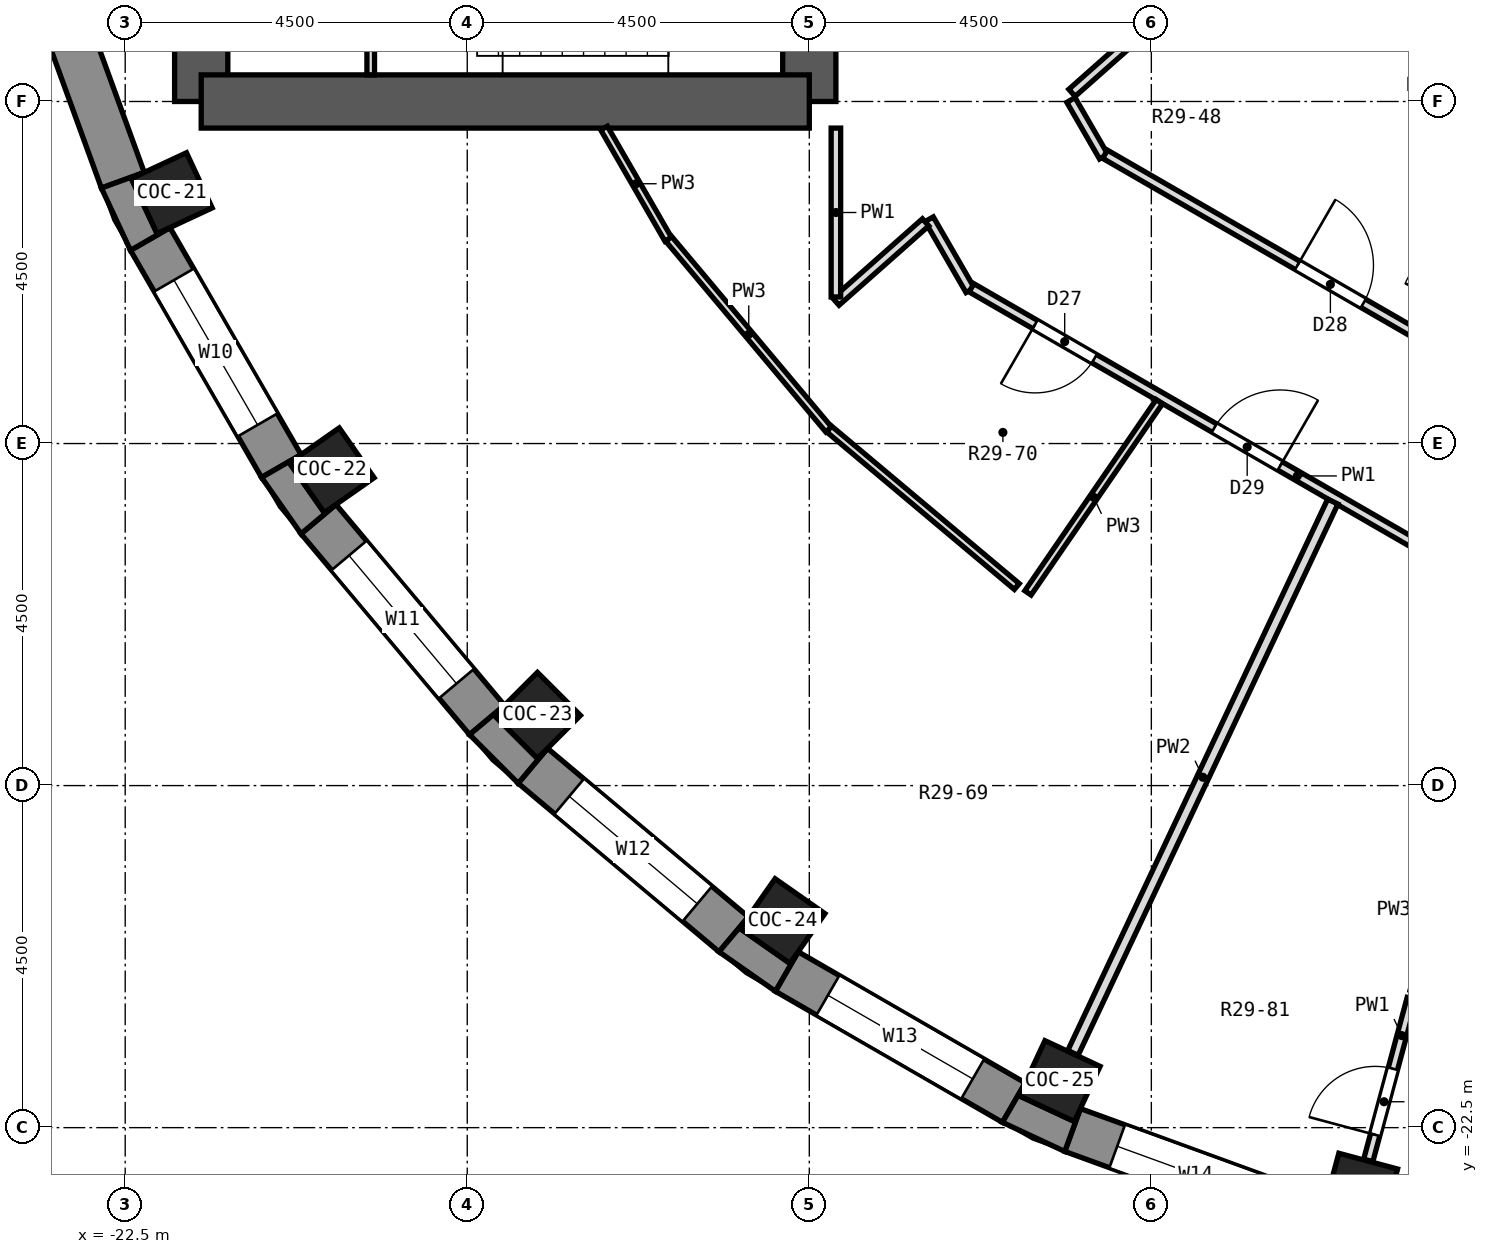
"""IFC4 building model, lengths in metres.
Left out: names, types, materials, properties, quantities, classifications, styles, units other than length and angle.
Written with IfcOpenShell. Run it as: python <this file> out.ifc"""

import sys

from ifc_helpers import new_model, si_unit, direction, frame, frame_2d, origin, origin_2d, place, context, subcontext, project, spatial, polyline, rectangle, outline, extrude, element, fill, save


model = new_model("IFC4")
c1 = context("Model", 3, precision=1e-05, world=origin(), true_north=direction((0.0, 1.0)))
c2 = subcontext(c1, "Body", "Model", "MODEL_VIEW")
j1 = project(units=[si_unit("LENGTHUNIT", "METRE"), si_unit("PLANEANGLEUNIT", "RADIAN")], contexts=[c1])
p1 = place(None, origin())
s1 = spatial("IfcSite", under=j1, at=p1, CompositionType="ELEMENT")
p2 = place(p1, origin())
s2 = spatial("IfcBuilding", under=s1, at=p2, CompositionType="ELEMENT")
p3 = place(p2, frame((0.0, 0.0, 200.4)))
s3 = spatial("IfcBuildingStorey", under=s2, at=p3, CompositionType="ELEMENT", Elevation=200.4)
for number, where, z_axis, x_axis in (
    (1, (-21.887, -10.206, 0.0), (0.0, 0.0, 1.0), (-0.906, -0.423, 0.0)),
    (2, (-19.782, -13.852, 0.0), (0.0, 0.0, 1.0), (-0.819, -0.574, 0.0)),
    (3, (-17.077, -17.077, 0.0), (0.0, 0.0, 1.0), (-0.707, -0.707, 0.0)),
    (4, (-13.852, -19.782, 0.0), (0.0, 0.0, 1.0), (-0.574, -0.819, 0.0)),
    (5, (-10.206, -21.887, 0.0), (0.0, 0.0, 1.0), (-0.423, -0.906, 0.0)),
    (6, (-6.25, -23.327, 0.0), (0.0, 0.0, 1.0), (-0.259, -0.966, 0.0)),
):
    element("IfcColumn", number, at=place(p3, frame(where, z_axis=z_axis, x_axis=x_axis)), inside=s3, PredefinedType="COLUMN", context=c2, shape_type="SweptSolid", body=[
        extrude(rectangle(XDim=0.8, YDim=0.8, at=origin_2d()), origin(), (0.0, 0.0, 1.0), 3.3),
    ])
p4 = place(p3, frame((-13.5, -9.0, 0.0), z_axis=(0.0, 0.0, 1.0), x_axis=(0.0, 1.0, 0.0)))
e7 = element("IfcWall", 7, at=p4, inside=s3, PredefinedType="SHEAR", context=c2, shape_type="SweptSolid", body=[
    extrude(rectangle(XDim=18.0, YDim=0.7, at=frame_2d((9.0, 0.0))), origin(), (0.0, 0.0, 1.0), 3.3),
])
p5 = place(p4, frame((15.4, 0.0, 0.0)))
e8 = element("IfcOpeningElement", 8, at=p5, cuts=e7, PredefinedType="OPENING", context=c2, shape_type="SweptSolid", body=[
    extrude(rectangle(XDim=1.2, YDim=2.1, at=frame_2d((0.6, 1.05))), frame((0.0, 0.362, 0.0), z_axis=(0.0, -1.0, 0.0), x_axis=(1.0, 0.0, 0.0)), (0.0, 0.0, 1.0), 0.724),
])
p6 = place(p4, frame((1.4, 0.0, 0.0)))
e9 = element("IfcOpeningElement", 9, at=p6, cuts=e7, PredefinedType="OPENING", context=c2, shape_type="SweptSolid", body=[
    extrude(rectangle(XDim=1.2, YDim=2.1, at=frame_2d((0.6, 1.05))), frame((0.0, 0.362, 0.0), z_axis=(0.0, -1.0, 0.0), x_axis=(1.0, 0.0, 0.0)), (0.0, 0.0, 1.0), 0.724),
])
p7 = place(p4, frame((7.5, 0.0, 0.0)))
e10 = element("IfcOpeningElement", 10, at=p7, cuts=e7, PredefinedType="OPENING", context=c2, shape_type="SweptSolid", body=[
    extrude(rectangle(XDim=3.0, YDim=2.4, at=frame_2d((1.5, 1.2))), frame((0.0, 0.362, 0.0), z_axis=(0.0, -1.0, 0.0), x_axis=(1.0, 0.0, 0.0)), (0.0, 0.0, 1.0), 0.724),
])
p8 = place(p3, frame((-21.5, -9.0, 0.0), z_axis=(0.0, 0.0, 1.0), x_axis=(0.0, 1.0, 0.0)))
e11 = element("IfcWall", 11, at=p8, inside=s3, PredefinedType="SHEAR", context=c2, shape_type="SweptSolid", body=[
    extrude(rectangle(XDim=18.0, YDim=0.7, at=frame_2d((9.0, 0.0))), origin(), (0.0, 0.0, 1.0), 3.3),
])
p9 = place(p8, frame((9.45, 0.0, 0.0)))
e12 = element("IfcOpeningElement", 12, at=p9, cuts=e11, PredefinedType="OPENING", context=c2, shape_type="SweptSolid", body=[
    extrude(rectangle(XDim=0.9, YDim=2.1, at=frame_2d((0.45, 1.05))), frame((0.0, 0.362, 0.0), z_axis=(0.0, -1.0, 0.0), x_axis=(1.0, 0.0, 0.0)), (0.0, 0.0, 1.0), 0.724),
])
p10 = place(p8, frame((7.65, 0.0, 0.0)))
e13 = element("IfcOpeningElement", 13, at=p10, cuts=e11, PredefinedType="OPENING", context=c2, shape_type="SweptSolid", body=[
    extrude(rectangle(XDim=0.9, YDim=2.1, at=frame_2d((0.45, 1.05))), frame((0.0, 0.362, 0.0), z_axis=(0.0, -1.0, 0.0), x_axis=(1.0, 0.0, 0.0)), (0.0, 0.0, 1.0), 0.724),
])
p11 = place(p3, frame((-13.5, -9.0, 0.0), z_axis=(0.0, 0.0, 1.0), x_axis=(-1.0, 0.0, 0.0)))
e14 = element("IfcWall", 14, at=p11, inside=s3, PredefinedType="SHEAR", context=c2, shape_type="SweptSolid", body=[
    extrude(rectangle(XDim=8.0, YDim=0.7, at=frame_2d((4.0, 0.0))), origin(), (0.0, 0.0, 1.0), 3.3),
])
p12 = place(p3, frame((-23.711, -6.794, 0.0), z_axis=(0.0, 0.0, 1.0), x_axis=(0.342032843455, -0.93968799822, 0.0)))
e15 = element("IfcWall", 15, at=p12, inside=s3, PredefinedType="SOLIDWALL", context=c2, shape_type="SweptSolid", body=[
    extrude(rectangle(XDim=3.45, YDim=0.6, at=frame_2d((1.725, 0.0))), origin(), (0.0, 0.0, 1.0), 2.85),
])
p13 = place(p3, frame((-22.171, -10.809, 0.0), z_axis=(0.0, 0.0, 1.0), x_axis=(0.499998129301, -0.86602648383, 0.0)))
e16 = element("IfcWall", 16, at=p13, inside=s3, PredefinedType="SOLIDWALL", context=c2, shape_type="SweptSolid", body=[
    extrude(rectangle(XDim=3.45, YDim=0.6, at=frame_2d((1.725, 0.0))), origin(), (0.0, 0.0, 1.0), 2.85),
])
p14 = place(p13, frame((0.625, 0.0, 0.9)))
e17 = element("IfcOpeningElement", 17, at=p14, cuts=e16, PredefinedType="OPENING", context=c2, shape_type="SweptSolid", body=[
    extrude(rectangle(XDim=2.2, YDim=1.8, at=frame_2d((1.1, 0.9))), frame((0.0, 0.312, 0.0), z_axis=(0.0, -1.0, 0.0), x_axis=(1.0, 0.0, 0.0)), (0.0, 0.0, 1.0), 0.624),
])
p15 = place(p3, frame((-19.957, -14.494, 0.0), z_axis=(0.0, 0.0, 1.0), x_axis=(0.642770398358, -0.766058884809, 0.0)))
e18 = element("IfcWall", 18, at=p15, inside=s3, PredefinedType="SOLIDWALL", context=c2, shape_type="SweptSolid", body=[
    extrude(rectangle(XDim=3.449, YDim=0.6, at=frame_2d((1.725, 0.0))), origin(), (0.0, 0.0, 1.0), 2.85),
])
p16 = place(p15, frame((0.625, 0.0, 0.9)))
e19 = element("IfcOpeningElement", 19, at=p16, cuts=e18, PredefinedType="OPENING", context=c2, shape_type="SweptSolid", body=[
    extrude(rectangle(XDim=2.2, YDim=1.8, at=frame_2d((1.1, 0.9))), frame((0.0, 0.312, 0.0), z_axis=(0.0, -1.0, 0.0), x_axis=(1.0, 0.0, 0.0)), (0.0, 0.0, 1.0), 0.624),
])
p17 = place(p3, frame((-17.137, -17.74, 0.0), z_axis=(0.0, 0.0, 1.0), x_axis=(0.766058884809, -0.642770398358, 0.0)))
e20 = element("IfcWall", 20, at=p17, inside=s3, PredefinedType="SOLIDWALL", context=c2, shape_type="SweptSolid", body=[
    extrude(rectangle(XDim=3.449, YDim=0.6, at=frame_2d((1.725, 0.0))), origin(), (0.0, 0.0, 1.0), 2.85),
])
p18 = place(p17, frame((0.625, 0.0, 0.9)))
e21 = element("IfcOpeningElement", 21, at=p18, cuts=e20, PredefinedType="OPENING", context=c2, shape_type="SweptSolid", body=[
    extrude(rectangle(XDim=2.2, YDim=1.8, at=frame_2d((1.1, 0.9))), frame((0.0, 0.312, 0.0), z_axis=(0.0, -1.0, 0.0), x_axis=(1.0, 0.0, 0.0)), (0.0, 0.0, 1.0), 0.624),
])
p19 = place(p3, frame((-13.796, -20.446, 0.0), z_axis=(0.0, 0.0, 1.0), x_axis=(0.86602648383, -0.499998129301, 0.0)))
e22 = element("IfcWall", 22, at=p19, inside=s3, PredefinedType="SOLIDWALL", context=c2, shape_type="SweptSolid", body=[
    extrude(rectangle(XDim=3.45, YDim=0.6, at=frame_2d((1.725, 0.0))), origin(), (0.0, 0.0, 1.0), 2.85),
])
p20 = place(p19, frame((0.625, 0.0, 0.9)))
e23 = element("IfcOpeningElement", 23, at=p20, cuts=e22, PredefinedType="OPENING", context=c2, shape_type="SweptSolid", body=[
    extrude(rectangle(XDim=2.2, YDim=1.8, at=frame_2d((1.1, 0.9))), frame((0.0, 0.312, 0.0), z_axis=(0.0, -1.0, 0.0), x_axis=(1.0, 0.0, 0.0)), (0.0, 0.0, 1.0), 0.624),
])
p21 = place(p3, frame((-10.036, -22.531, 0.0), z_axis=(0.0, 0.0, 1.0), x_axis=(0.93968799822, -0.342032843455, 0.0)))
e24 = element("IfcWall", 24, at=p21, inside=s3, PredefinedType="SOLIDWALL", context=c2, shape_type="SweptSolid", body=[
    extrude(rectangle(XDim=3.45, YDim=0.6, at=frame_2d((1.725, 0.0))), origin(), (0.0, 0.0, 1.0), 2.85),
])
p22 = place(p21, frame((0.625, 0.0, 0.9)))
e25 = element("IfcOpeningElement", 25, at=p22, cuts=e24, PredefinedType="OPENING", context=c2, shape_type="SweptSolid", body=[
    extrude(rectangle(XDim=2.2, YDim=1.8, at=frame_2d((1.1, 0.9))), frame((0.0, 0.312, 0.0), z_axis=(0.0, -1.0, 0.0), x_axis=(1.0, 0.0, 0.0)), (0.0, 0.0, 1.0), 0.624),
])
p23 = place(p3, origin())
e26 = element("IfcWall", 26, at=p23, inside=s3, PredefinedType="SOLIDWALL", context=c2, shape_type="SweptSolid", body=[
    extrude(outline(polyline([(-22.431, -10.959), (-21.911, -10.659), (-22.081, -10.738), (-22.419, -10.013), (-22.249, -9.934), (-22.813, -10.139), (-22.431, -10.959)])), origin(), (0.0, 0.0, 1.0), 2.85),
])
p24 = place(p3, origin())
e27 = element("IfcWall", 27, at=p24, inside=s3, PredefinedType="SOLIDWALL", context=c2, shape_type="SweptSolid", body=[
    extrude(outline(polyline([(-20.706, -13.946), (-20.187, -14.687), (-19.727, -14.302), (-19.881, -14.409), (-20.34, -13.754), (-20.186, -13.646), (-20.706, -13.946)])), origin(), (0.0, 0.0, 1.0), 2.85),
])
p25 = place(p3, origin())
e28 = element("IfcWall", 28, at=p25, inside=s3, PredefinedType="SOLIDWALL", context=c2, shape_type="SweptSolid", body=[
    extrude(outline(polyline([(-17.33, -17.969), (-16.944, -17.51), (-17.077, -17.642), (-17.642, -17.077), (-17.51, -16.944), (-17.969, -17.33), (-17.33, -17.969)])), origin(), (0.0, 0.0, 1.0), 2.85),
])
p26 = place(p3, origin())
e29 = element("IfcWall", 29, at=p26, inside=s3, PredefinedType="SOLIDWALL", context=c2, shape_type="SweptSolid", body=[
    extrude(outline(polyline([(-14.687, -20.187), (-13.946, -20.706), (-13.646, -20.186), (-13.754, -20.34), (-14.409, -19.881), (-14.302, -19.727), (-14.687, -20.187)])), origin(), (0.0, 0.0, 1.0), 2.85),
])
p27 = place(p3, origin())
e30 = element("IfcWall", 30, at=p27, inside=s3, PredefinedType="SOLIDWALL", context=c2, shape_type="SweptSolid", body=[
    extrude(outline(polyline([(-10.139, -22.813), (-9.934, -22.249), (-10.013, -22.419), (-10.738, -22.081), (-10.659, -21.911), (-10.959, -22.431), (-10.139, -22.813)])), origin(), (0.0, 0.0, 1.0), 2.85),
])
p28 = place(p3, frame((-5.826, -6.22, 0.0), z_axis=(0.0, 0.0, 1.0), x_axis=(0.866005929495, -0.500033728941, 0.0)))
e31 = element("IfcWall", 31, at=p28, inside=s3, PredefinedType="SOLIDWALL", context=c2, shape_type="SweptSolid", body=[
    extrude(rectangle(XDim=3.87, YDim=0.6, at=frame_2d((1.935, 0.0))), origin(), (0.0, 0.0, 1.0), 2.85),
])
p29 = place(p28, frame((0.735, 0.0, 0.9)))
e32 = element("IfcOpeningElement", 32, at=p29, cuts=e31, PredefinedType="OPENING", context=c2, shape_type="SweptSolid", body=[
    extrude(rectangle(XDim=2.4, YDim=1.8, at=frame_2d((1.2, 0.9))), frame((0.0, 0.312, 0.0), z_axis=(0.0, -1.0, 0.0), x_axis=(1.0, 0.0, 0.0)), (0.0, 0.0, 1.0), 0.624),
])
p30 = place(p3, frame((-16.2, -9.35, 0.0), z_axis=(0.0, 0.0, 1.0), x_axis=(0.499589038157, -0.866262542739, 0.0)))
e33 = element("IfcWall", 33, at=p30, inside=s3, PredefinedType="PARTITIONING", context=c2, shape_type="SweptSolid", body=[
    extrude(rectangle(XDim=1.69, YDim=0.1, at=frame_2d((0.845, 0.0))), origin(), (0.0, 0.0, 1.0), 2.85),
])
p31 = place(p3, frame((-11.923, -10.549, 0.0), z_axis=(0.0, 0.0, 1.0), x_axis=(0.500304011038, -0.865849811769, 0.0)))
e34 = element("IfcWall", 34, at=p31, inside=s3, PredefinedType="PARTITIONING", context=c2, shape_type="SweptSolid", body=[
    extrude(rectangle(XDim=1.078, YDim=0.125, at=frame_2d((0.539, 0.0))), origin(), (0.0, 0.0, 1.0), 2.85),
])
p32 = place(p3, frame((-10.058, -8.98, 0.0), z_axis=(0.0, 0.0, 1.0), x_axis=(0.500409926597, -0.865788603161, 0.0)))
e35 = element("IfcWall", 35, at=p32, inside=s3, PredefinedType="PARTITIONING", context=c2, shape_type="SweptSolid", body=[
    extrude(rectangle(XDim=0.861, YDim=0.125, at=frame_2d((0.43, 0.0))), origin(), (0.0, 0.0, 1.0), 2.85),
])
p33 = place(p3, frame((-15.349, -10.808, 0.0), z_axis=(0.0, 0.0, 1.0), x_axis=(0.642857965628, -0.765985401968, 0.0)))
e36 = element("IfcWall", 36, at=p33, inside=s3, PredefinedType="PARTITIONING", context=c2, shape_type="SweptSolid", body=[
    extrude(rectangle(XDim=3.274, YDim=0.1, at=frame_2d((1.637, 0.0))), origin(), (0.0, 0.0, 1.0), 2.85),
])
p34 = place(p3, frame((-13.239, -13.309, 0.0), z_axis=(0.0, 0.0, 1.0), x_axis=(0.76596892519, -0.642877597714, 0.0)))
e37 = element("IfcWall", 37, at=p34, inside=s3, PredefinedType="PARTITIONING", context=c2, shape_type="SweptSolid", body=[
    extrude(rectangle(XDim=3.223, YDim=0.1, at=frame_2d((1.612, 0.0))), origin(), (0.0, 0.0, 1.0), 2.85),
])
p35 = place(p3, frame((-11.366, -11.451, 0.0), z_axis=(0.0, 0.0, 1.0), x_axis=(0.866023369196, -0.500003523994, 0.0)))
e38 = element("IfcWall", 38, at=p35, inside=s3, PredefinedType="PARTITIONING", context=c2, shape_type="SweptSolid", body=[
    extrude(rectangle(XDim=8.371, YDim=0.125, at=frame_2d((4.186, 0.0))), origin(), (0.0, 0.0, 1.0), 2.85),
])
p36 = place(p35, frame((0.966, 0.0, 0.0)))
e39 = element("IfcOpeningElement", 39, at=p36, cuts=e38, PredefinedType="OPENING", context=c2, shape_type="SweptSolid", body=[
    extrude(rectangle(XDim=0.9, YDim=2.1, at=frame_2d((0.45, 1.05))), frame((0.0, 0.074, 0.0), z_axis=(0.0, -1.0, 0.0), x_axis=(1.0, 0.0, 0.0)), (0.0, 0.0, 1.0), 0.149),
])
p37 = place(p35, frame((3.688, 0.0, 0.0)))
e40 = element("IfcOpeningElement", 40, at=p37, cuts=e38, PredefinedType="OPENING", context=c2, shape_type="SweptSolid", body=[
    extrude(rectangle(XDim=1.0, YDim=2.1, at=frame_2d((0.5, 1.05))), frame((0.0, 0.074, 0.0), z_axis=(0.0, -1.0, 0.0), x_axis=(1.0, 0.0, 0.0)), (0.0, 0.0, 1.0), 0.149),
])
p38 = place(p3, frame((-9.609, -9.694, 0.0), z_axis=(0.0, 0.0, 1.0), x_axis=(0.866017984103, -0.500012851046, 0.0)))
e41 = element("IfcWall", 41, at=p38, inside=s3, PredefinedType="PARTITIONING", context=c2, shape_type="SweptSolid", body=[
    extrude(rectangle(XDim=7.083, YDim=0.125, at=frame_2d((3.542, 0.0))), origin(), (0.0, 0.0, 1.0), 2.85),
])
p39 = place(p38, frame((2.923, 0.0, 0.0)))
e42 = element("IfcOpeningElement", 42, at=p39, cuts=e41, PredefinedType="OPENING", context=c2, shape_type="SweptSolid", body=[
    extrude(rectangle(XDim=1.0, YDim=2.1, at=frame_2d((0.5, 1.05))), frame((0.0, 0.074, 0.0), z_axis=(0.0, -1.0, 0.0), x_axis=(1.0, 0.0, 0.0)), (0.0, 0.0, 1.0), 0.149),
])
p40 = place(p3, frame((-13.15, -11.634, 0.0), z_axis=(0.0, 0.0, 1.0), x_axis=(0.748946277056, 0.662630722261, 0.0)))
e43 = element("IfcWall", 43, at=p40, inside=s3, PredefinedType="PARTITIONING", context=c2, shape_type="SweptSolid", body=[
    extrude(rectangle(XDim=1.575, YDim=0.125, at=frame_2d((0.788, 0.0))), origin(), (0.0, 0.0, 1.0), 2.85),
])
p41 = place(p3, frame((-10.044, -8.886, 0.0), z_axis=(0.0, 0.0, 1.0), x_axis=(0.748977300745, 0.662595655712, 0.0)))
e44 = element("IfcWall", 44, at=p41, inside=s3, PredefinedType="PARTITIONING", context=c2, shape_type="SweptSolid", body=[
    extrude(rectangle(XDim=4.839, YDim=0.125, at=frame_2d((2.419, 0.0))), origin(), (0.0, 0.0, 1.0), 2.85),
])
p42 = place(p3, frame((-10.623, -15.465, 0.0), z_axis=(0.0, 0.0, 1.0), x_axis=(0.566094144379, 0.824340596902, 0.0)))
e45 = element("IfcWall", 45, at=p42, inside=s3, PredefinedType="PARTITIONING", context=c2, shape_type="SweptSolid", body=[
    extrude(rectangle(XDim=3.052, YDim=0.1, at=frame_2d((1.526, 0.0))), origin(), (0.0, 0.0, 1.0), 2.85),
])
p43 = place(p3, frame((-10.031, -21.517, 0.0), z_axis=(0.0, 0.0, 1.0), x_axis=(0.426351254657, 0.904557686194, 0.0)))
e46 = element("IfcWall", 46, at=p43, inside=s3, PredefinedType="PARTITIONING", context=c2, shape_type="SweptSolid", body=[
    extrude(rectangle(XDim=8.018, YDim=0.15, at=frame_2d((4.009, 0.0))), origin(), (0.0, 0.0, 1.0), 2.85),
])
p44 = place(p3, frame((-6.146, -22.931, 0.0), z_axis=(0.0, 0.0, 1.0), x_axis=(0.259544407095, 0.965731174161, 0.0)))
e47 = element("IfcWall", 47, at=p44, inside=s3, PredefinedType="PARTITIONING", context=c2, shape_type="SweptSolid", body=[
    extrude(rectangle(XDim=2.204, YDim=0.125, at=frame_2d((1.102, 0.0))), origin(), (0.0, 0.0, 1.0), 2.85),
])
p45 = place(p44, frame((0.349, 0.0, 0.0)))
e48 = element("IfcOpeningElement", 48, at=p45, cuts=e47, PredefinedType="OPENING", context=c2, shape_type="SweptSolid", body=[
    extrude(rectangle(XDim=0.9, YDim=2.1, at=frame_2d((0.45, 1.05))), frame((0.0, 0.074, 0.0), z_axis=(0.0, -1.0, 0.0), x_axis=(1.0, 0.0, 0.0)), (0.0, 0.0, 1.0), 0.149),
])
p46 = place(p3, frame((-13.15, -11.572, 0.0), z_axis=(0.0, 0.0, 1.0), x_axis=(0.0, 1.0, 0.0)))
e49 = element("IfcWall", 49, at=p46, inside=s3, PredefinedType="PARTITIONING", context=c2, shape_type="SweptSolid", body=[
    extrude(rectangle(XDim=2.221, YDim=0.125, at=frame_2d((1.111, 0.0))), origin(), (0.0, 0.0, 1.0), 2.85),
])
p47 = place(p3, frame((-19.27, -8.65, 0.0), z_axis=(0.0, 0.0, 1.0), x_axis=(0.0, 1.0, 0.0)))
e50 = element("IfcWall", 50, at=p47, inside=s3, PredefinedType="PARTITIONING", context=c2, shape_type="SweptSolid", body=[
    extrude(rectangle(XDim=3.45, YDim=0.1, at=frame_2d((1.725, 0.0))), origin(), (0.0, 0.0, 1.0), 2.85),
])
p48 = place(p14, origin())
e51 = element("IfcWindow", 51, at=p48, inside=s3, PartitioningType="SINGLE_PANEL", PredefinedType="WINDOW", context=c2, shape_type="SweptSolid", body=[
    extrude(rectangle(XDim=2.2, YDim=1.8, at=frame_2d((1.1, 0.9))), frame((0.0, 0.18, 0.0), z_axis=(0.0, -1.0, 0.0), x_axis=(1.0, 0.0, 0.0)), (0.0, 0.0, 1.0), 0.06),
])
fill(e17, e51)
p49 = place(p16, origin())
e52 = element("IfcWindow", 52, at=p49, inside=s3, PartitioningType="SINGLE_PANEL", PredefinedType="WINDOW", context=c2, shape_type="SweptSolid", body=[
    extrude(rectangle(XDim=2.2, YDim=1.8, at=frame_2d((1.1, 0.9))), frame((0.0, 0.18, 0.0), z_axis=(0.0, -1.0, 0.0), x_axis=(1.0, 0.0, 0.0)), (0.0, 0.0, 1.0), 0.06),
])
fill(e19, e52)
p50 = place(p18, origin())
e53 = element("IfcWindow", 53, at=p50, inside=s3, PartitioningType="SINGLE_PANEL", PredefinedType="WINDOW", context=c2, shape_type="SweptSolid", body=[
    extrude(rectangle(XDim=2.2, YDim=1.8, at=frame_2d((1.1, 0.9))), frame((0.0, 0.18, 0.0), z_axis=(0.0, -1.0, 0.0), x_axis=(1.0, 0.0, 0.0)), (0.0, 0.0, 1.0), 0.06),
])
fill(e21, e53)
p51 = place(p20, origin())
e54 = element("IfcWindow", 54, at=p51, inside=s3, PartitioningType="SINGLE_PANEL", PredefinedType="WINDOW", context=c2, shape_type="SweptSolid", body=[
    extrude(rectangle(XDim=2.2, YDim=1.8, at=frame_2d((1.1, 0.9))), frame((0.0, 0.18, 0.0), z_axis=(0.0, -1.0, 0.0), x_axis=(1.0, 0.0, 0.0)), (0.0, 0.0, 1.0), 0.06),
])
fill(e23, e54)
p52 = place(p22, origin())
e55 = element("IfcWindow", 55, at=p52, inside=s3, PartitioningType="SINGLE_PANEL", PredefinedType="WINDOW", context=c2, shape_type="SweptSolid", body=[
    extrude(rectangle(XDim=2.2, YDim=1.8, at=frame_2d((1.1, 0.9))), frame((0.0, 0.18, 0.0), z_axis=(0.0, -1.0, 0.0), x_axis=(1.0, 0.0, 0.0)), (0.0, 0.0, 1.0), 0.06),
])
fill(e25, e55)
p53 = place(p36, frame((0.9, 0.0, 0.0), z_axis=(0.0, 0.0, 1.0), x_axis=(-1.0, 0.0, 0.0)))
e56 = element("IfcDoor", 56, at=p53, inside=s3, OperationType="SINGLE_SWING_RIGHT", PredefinedType="DOOR", context=c2, shape_type="SweptSolid", body=[
    extrude(rectangle(XDim=0.9, YDim=2.1, at=frame_2d((0.45, 1.05))), frame((0.0, 0.025, 0.0), z_axis=(0.0, -1.0, 0.0), x_axis=(1.0, 0.0, 0.0)), (0.0, 0.0, 1.0), 0.05),
])
fill(e39, e56)
p54 = place(p39, origin())
e57 = element("IfcDoor", 57, at=p54, inside=s3, OperationType="SINGLE_SWING_LEFT", PredefinedType="DOOR", context=c2, shape_type="SweptSolid", body=[
    extrude(rectangle(XDim=1.0, YDim=2.1, at=frame_2d((0.5, 1.05))), frame((0.0, 0.025, 0.0), z_axis=(0.0, -1.0, 0.0), x_axis=(1.0, 0.0, 0.0)), (0.0, 0.0, 1.0), 0.05),
])
fill(e42, e57)
p55 = place(p37, origin())
e58 = element("IfcDoor", 58, at=p55, inside=s3, OperationType="SINGLE_SWING_RIGHT", PredefinedType="DOOR", context=c2, shape_type="SweptSolid", body=[
    extrude(rectangle(XDim=1.0, YDim=2.1, at=frame_2d((0.5, 1.05))), frame((0.0, 0.025, 0.0), z_axis=(0.0, -1.0, 0.0), x_axis=(1.0, 0.0, 0.0)), (0.0, 0.0, 1.0), 0.05),
])
fill(e40, e58)
p56 = place(p45, origin())
e59 = element("IfcDoor", 59, at=p56, inside=s3, OperationType="SINGLE_SWING_LEFT", PredefinedType="DOOR", context=c2, shape_type="SweptSolid", body=[
    extrude(rectangle(XDim=0.9, YDim=2.1, at=frame_2d((0.45, 1.05))), frame((0.0, 0.025, 0.0), z_axis=(0.0, -1.0, 0.0), x_axis=(1.0, 0.0, 0.0)), (0.0, 0.0, 1.0), 0.05),
])
fill(e48, e59)
save(model, sys.argv[1])
